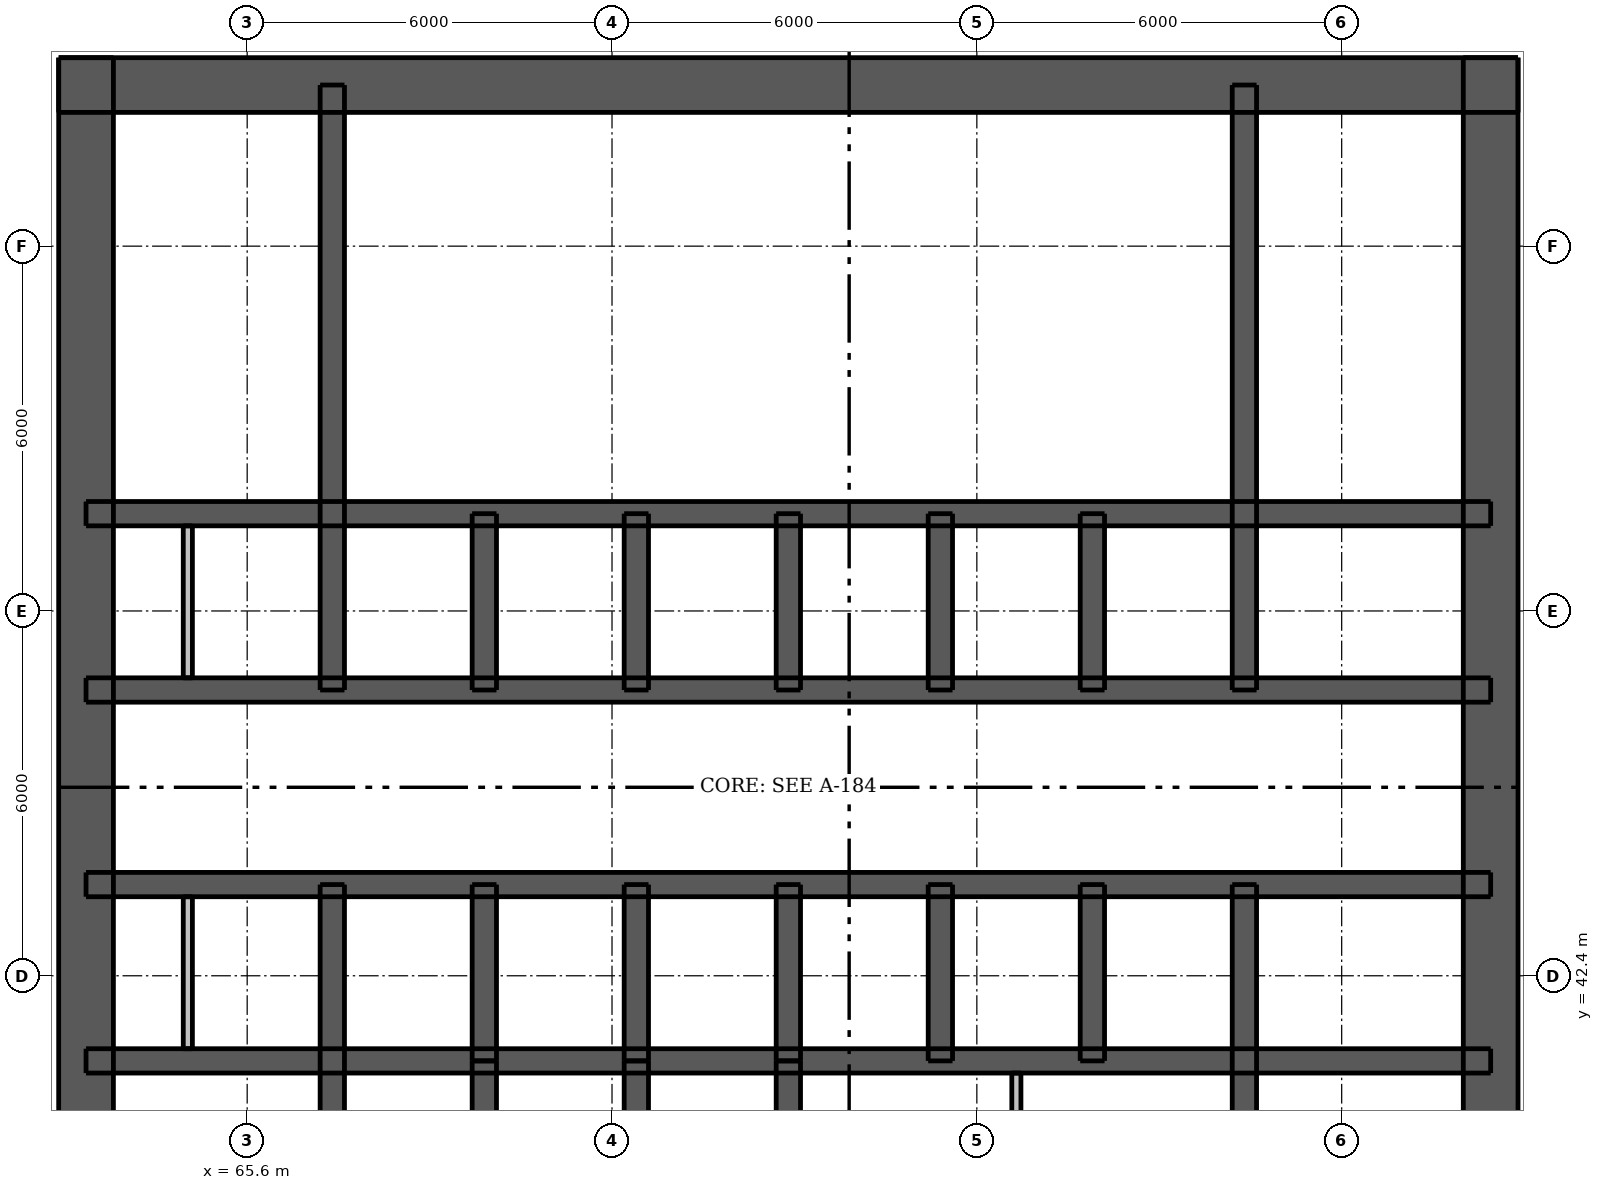
"""IFC4 building model, lengths in metres.
Left out: names, types, materials, properties, quantities, classifications, styles, units other than length and angle.
Written with IfcOpenShell. Run it as: python <this file> out.ifc"""

import sys

from ifc_helpers import new_model, si_unit, direction, frame, frame_2d, origin, place, context, subcontext, project, spatial, rectangle, extrude, element, fill, save


model = new_model("IFC4")
c1 = context("Model", 3, precision=1e-05, world=origin(), true_north=direction((0.0, 1.0)))
c2 = subcontext(c1, "Body", "Model", "MODEL_VIEW")
j1 = project(units=[si_unit("LENGTHUNIT", "METRE"), si_unit("PLANEANGLEUNIT", "RADIAN")], contexts=[c1])
p1 = place(None, origin())
s1 = spatial("IfcSite", under=j1, at=p1, CompositionType="ELEMENT")
p2 = place(p1, origin())
s2 = spatial("IfcBuilding", under=s1, at=p2, CompositionType="ELEMENT")
p3 = place(p2, frame((0.0, 0.0, 19.0)))
s3 = spatial("IfcBuildingStorey", under=s2, at=p3, CompositionType="ELEMENT", Elevation=19.0)
p4 = place(p3, frame((62.5, 57.05, 0.0), z_axis=(0.0, 0.0, 1.0), x_axis=(1.0, 0.0, 0.0)))
e1 = element("IfcWall", 1, at=p4, inside=s3, PredefinedType="SHEAR", context=c2, shape_type="SweptSolid", body=[
    extrude(rectangle(XDim=24.0, YDim=0.9, at=frame_2d((12.0, 0.0))), origin(), (0.0, 0.0, 1.0), 4.25),
])
p5 = place(p4, frame((20.85, 0.0, 0.0)))
e2 = element("IfcOpeningElement", 2, at=p5, cuts=e1, PredefinedType="OPENING", context=c2, shape_type="SweptSolid", body=[
    extrude(rectangle(XDim=1.1, YDim=2.1, at=frame_2d((0.55, 1.05))), frame((0.0, 0.46, 0.0), z_axis=(0.0, -1.0, 0.0), x_axis=(1.0, 0.0, 0.0)), (0.0, 0.0, 1.0), 0.92),
])
p6 = place(p4, frame((2.05, 0.0, 0.0)))
e3 = element("IfcOpeningElement", 3, at=p6, cuts=e1, PredefinedType="OPENING", context=c2, shape_type="SweptSolid", body=[
    extrude(rectangle(XDim=1.1, YDim=2.1, at=frame_2d((0.55, 1.05))), frame((0.0, 0.46, 0.0), z_axis=(0.0, -1.0, 0.0), x_axis=(1.0, 0.0, 0.0)), (0.0, 0.0, 1.0), 0.92),
])
p7 = place(p4, frame((11.55, 0.0, 0.0)))
e4 = element("IfcOpeningElement", 4, at=p7, cuts=e1, PredefinedType="OPENING", context=c2, shape_type="SweptSolid", body=[
    extrude(rectangle(XDim=0.9, YDim=2.1, at=frame_2d((0.45, 1.05))), frame((0.0, 0.46, 0.0), z_axis=(0.0, -1.0, 0.0), x_axis=(1.0, 0.0, 0.0)), (0.0, 0.0, 1.0), 0.92),
])
p8 = place(p3, frame((62.95, 33.5, 0.0), z_axis=(0.0, 0.0, 1.0), x_axis=(0.0, 1.0, 0.0)))
e5 = element("IfcWall", 5, at=p8, inside=s3, PredefinedType="SHEAR", context=c2, shape_type="SweptSolid", body=[
    extrude(rectangle(XDim=24.0, YDim=0.9, at=frame_2d((12.0, 0.0))), origin(), (0.0, 0.0, 1.0), 4.25),
])
p9 = place(p8, frame((11.2, 0.0, 0.0)))
e6 = element("IfcOpeningElement", 6, at=p9, cuts=e5, PredefinedType="OPENING", context=c2, shape_type="SweptSolid", body=[
    extrude(rectangle(XDim=1.6, YDim=2.1, at=frame_2d((0.8, 1.05))), frame((0.0, 0.46, 0.0), z_axis=(0.0, -1.0, 0.0), x_axis=(1.0, 0.0, 0.0)), (0.0, 0.0, 1.0), 0.92),
])
p10 = place(p3, frame((86.05, 33.5, 0.0), z_axis=(0.0, 0.0, 1.0), x_axis=(0.0, 1.0, 0.0)))
e7 = element("IfcWall", 7, at=p10, inside=s3, PredefinedType="SHEAR", context=c2, shape_type="SweptSolid", body=[
    extrude(rectangle(XDim=24.0, YDim=0.9, at=frame_2d((12.0, 0.0))), origin(), (0.0, 0.0, 1.0), 4.25),
])
p11 = place(p10, frame((11.2, 0.0, 0.0)))
e8 = element("IfcOpeningElement", 8, at=p11, cuts=e7, PredefinedType="OPENING", context=c2, shape_type="SweptSolid", body=[
    extrude(rectangle(XDim=1.6, YDim=2.1, at=frame_2d((0.8, 1.05))), frame((0.0, 0.46, 0.0), z_axis=(0.0, -1.0, 0.0), x_axis=(1.0, 0.0, 0.0)), (0.0, 0.0, 1.0), 0.92),
])
p12 = place(p3, frame((62.95, 41.0, 0.0), z_axis=(0.0, 0.0, 1.0), x_axis=(1.0, 0.0, 0.0)))
e9 = element("IfcWall", 9, at=p12, inside=s3, PredefinedType="SHEAR", context=c2, shape_type="SweptSolid", body=[
    extrude(rectangle(XDim=23.1, YDim=0.4, at=frame_2d((11.55, 0.0))), origin(), (0.0, 0.0, 1.0), 4.25),
])
p13 = place(p3, frame((62.95, 43.9, 0.0), z_axis=(0.0, 0.0, 1.0), x_axis=(1.0, 0.0, 0.0)))
e10 = element("IfcWall", 10, at=p13, inside=s3, PredefinedType="SHEAR", context=c2, shape_type="SweptSolid", body=[
    extrude(rectangle(XDim=23.1, YDim=0.4, at=frame_2d((11.55, 0.0))), origin(), (0.0, 0.0, 1.0), 4.25),
])
p14 = place(p13, frame((0.662, 0.0, 0.0)))
e11 = element("IfcOpeningElement", 11, at=p14, cuts=e10, PredefinedType="OPENING", context=c2, shape_type="SweptSolid", body=[
    extrude(rectangle(XDim=0.8, YDim=2.1, at=frame_2d((0.4, 1.05))), frame((0.0, 0.21, 0.0), z_axis=(0.0, -1.0, 0.0), x_axis=(1.0, 0.0, 0.0)), (0.0, 0.0, 1.0), 0.42),
])
p15 = place(p13, frame((2.312, 0.0, 0.0)))
e12 = element("IfcOpeningElement", 12, at=p15, cuts=e10, PredefinedType="OPENING", context=c2, shape_type="SweptSolid", body=[
    extrude(rectangle(XDim=0.9, YDim=2.1, at=frame_2d((0.45, 1.05))), frame((0.0, 0.21, 0.0), z_axis=(0.0, -1.0, 0.0), x_axis=(1.0, 0.0, 0.0)), (0.0, 0.0, 1.0), 0.42),
])
p16 = place(p13, frame((20.5, 0.0, 0.0)))
e13 = element("IfcOpeningElement", 13, at=p16, cuts=e10, PredefinedType="OPENING", context=c2, shape_type="SweptSolid", body=[
    extrude(rectangle(XDim=0.9, YDim=2.1, at=frame_2d((0.45, 1.05))), frame((0.0, 0.21, 0.0), z_axis=(0.0, -1.0, 0.0), x_axis=(1.0, 0.0, 0.0)), (0.0, 0.0, 1.0), 0.42),
])
p17 = place(p13, frame((4.75, 0.0, 0.0)))
e14 = element("IfcOpeningElement", 14, at=p17, cuts=e10, PredefinedType="OPENING", context=c2, shape_type="SweptSolid", body=[
    extrude(rectangle(XDim=1.1, YDim=2.1, at=frame_2d((0.55, 1.05))), frame((0.0, 0.21, 0.0), z_axis=(0.0, -1.0, 0.0), x_axis=(1.0, 0.0, 0.0)), (0.0, 0.0, 1.0), 0.42),
])
p18 = place(p13, frame((7.25, 0.0, 0.0)))
e15 = element("IfcOpeningElement", 15, at=p18, cuts=e10, PredefinedType="OPENING", context=c2, shape_type="SweptSolid", body=[
    extrude(rectangle(XDim=1.1, YDim=2.1, at=frame_2d((0.55, 1.05))), frame((0.0, 0.21, 0.0), z_axis=(0.0, -1.0, 0.0), x_axis=(1.0, 0.0, 0.0)), (0.0, 0.0, 1.0), 0.42),
])
p19 = place(p13, frame((9.75, 0.0, 0.0)))
e16 = element("IfcOpeningElement", 16, at=p19, cuts=e10, PredefinedType="OPENING", context=c2, shape_type="SweptSolid", body=[
    extrude(rectangle(XDim=1.1, YDim=2.1, at=frame_2d((0.55, 1.05))), frame((0.0, 0.21, 0.0), z_axis=(0.0, -1.0, 0.0), x_axis=(1.0, 0.0, 0.0)), (0.0, 0.0, 1.0), 0.42),
])
p20 = place(p13, frame((12.25, 0.0, 0.0)))
e17 = element("IfcOpeningElement", 17, at=p20, cuts=e10, PredefinedType="OPENING", context=c2, shape_type="SweptSolid", body=[
    extrude(rectangle(XDim=1.1, YDim=2.1, at=frame_2d((0.55, 1.05))), frame((0.0, 0.21, 0.0), z_axis=(0.0, -1.0, 0.0), x_axis=(1.0, 0.0, 0.0)), (0.0, 0.0, 1.0), 0.42),
])
p21 = place(p13, frame((14.75, 0.0, 0.0)))
e18 = element("IfcOpeningElement", 18, at=p21, cuts=e10, PredefinedType="OPENING", context=c2, shape_type="SweptSolid", body=[
    extrude(rectangle(XDim=1.1, YDim=2.1, at=frame_2d((0.55, 1.05))), frame((0.0, 0.21, 0.0), z_axis=(0.0, -1.0, 0.0), x_axis=(1.0, 0.0, 0.0)), (0.0, 0.0, 1.0), 0.42),
])
p22 = place(p13, frame((17.25, 0.0, 0.0)))
e19 = element("IfcOpeningElement", 19, at=p22, cuts=e10, PredefinedType="OPENING", context=c2, shape_type="SweptSolid", body=[
    extrude(rectangle(XDim=1.1, YDim=2.1, at=frame_2d((0.55, 1.05))), frame((0.0, 0.21, 0.0), z_axis=(0.0, -1.0, 0.0), x_axis=(1.0, 0.0, 0.0)), (0.0, 0.0, 1.0), 0.42),
])
p23 = place(p3, frame((62.95, 47.1, 0.0), z_axis=(0.0, 0.0, 1.0), x_axis=(1.0, 0.0, 0.0)))
e20 = element("IfcWall", 20, at=p23, inside=s3, PredefinedType="SHEAR", context=c2, shape_type="SweptSolid", body=[
    extrude(rectangle(XDim=23.1, YDim=0.4, at=frame_2d((11.55, 0.0))), origin(), (0.0, 0.0, 1.0), 4.25),
])
p24 = place(p23, frame((0.662, 0.0, 0.0)))
e21 = element("IfcOpeningElement", 21, at=p24, cuts=e20, PredefinedType="OPENING", context=c2, shape_type="SweptSolid", body=[
    extrude(rectangle(XDim=0.8, YDim=2.1, at=frame_2d((0.4, 1.05))), frame((0.0, 0.21, 0.0), z_axis=(0.0, -1.0, 0.0), x_axis=(1.0, 0.0, 0.0)), (0.0, 0.0, 1.0), 0.42),
])
p25 = place(p23, frame((2.312, 0.0, 0.0)))
e22 = element("IfcOpeningElement", 22, at=p25, cuts=e20, PredefinedType="OPENING", context=c2, shape_type="SweptSolid", body=[
    extrude(rectangle(XDim=0.9, YDim=2.1, at=frame_2d((0.45, 1.05))), frame((0.0, 0.21, 0.0), z_axis=(0.0, -1.0, 0.0), x_axis=(1.0, 0.0, 0.0)), (0.0, 0.0, 1.0), 0.42),
])
p26 = place(p23, frame((20.5, 0.0, 0.0)))
e23 = element("IfcOpeningElement", 23, at=p26, cuts=e20, PredefinedType="OPENING", context=c2, shape_type="SweptSolid", body=[
    extrude(rectangle(XDim=0.9, YDim=2.1, at=frame_2d((0.45, 1.05))), frame((0.0, 0.21, 0.0), z_axis=(0.0, -1.0, 0.0), x_axis=(1.0, 0.0, 0.0)), (0.0, 0.0, 1.0), 0.42),
])
p27 = place(p3, frame((62.95, 50.0, 0.0), z_axis=(0.0, 0.0, 1.0), x_axis=(1.0, 0.0, 0.0)))
e24 = element("IfcWall", 24, at=p27, inside=s3, PredefinedType="SHEAR", context=c2, shape_type="SweptSolid", body=[
    extrude(rectangle(XDim=23.1, YDim=0.4, at=frame_2d((11.55, 0.0))), origin(), (0.0, 0.0, 1.0), 4.25),
])
p28 = place(p3, frame((67.0, 33.95, 0.0), z_axis=(0.0, 0.0, 1.0), x_axis=(0.0, 1.0, 0.0)))
e25 = element("IfcWall", 25, at=p28, inside=s3, PredefinedType="SHEAR", context=c2, shape_type="SweptSolid", body=[
    extrude(rectangle(XDim=9.95, YDim=0.4, at=frame_2d((4.975, 0.0))), origin(), (0.0, 0.0, 1.0), 4.25),
])
p29 = place(p28, frame((0.65, 0.0, 0.0)))
e26 = element("IfcOpeningElement", 26, at=p29, cuts=e25, PredefinedType="OPENING", context=c2, shape_type="SweptSolid", body=[
    extrude(rectangle(XDim=1.1, YDim=2.1, at=frame_2d((0.55, 1.05))), frame((0.0, 0.21, 0.0), z_axis=(0.0, -1.0, 0.0), x_axis=(1.0, 0.0, 0.0)), (0.0, 0.0, 1.0), 0.42),
])
for number, where, z_axis, x_axis in (
    (27, (67.0, 47.1, 0.0), (0.0, 0.0, 1.0), (0.0, 1.0, 0.0)),
    (28, (82.0, 33.95, 0.0), (0.0, 0.0, 1.0), (0.0, 1.0, 0.0)),
    (29, (82.0, 47.1, 0.0), (0.0, 0.0, 1.0), (0.0, 1.0, 0.0)),
):
    element("IfcWall", number, at=place(p3, frame(where, z_axis=z_axis, x_axis=x_axis)), inside=s3, PredefinedType="SHEAR", context=c2, shape_type="SweptSolid", body=[
        extrude(rectangle(XDim=9.95, YDim=0.4, at=frame_2d((4.975, 0.0))), origin(), (0.0, 0.0, 1.0), 4.25),
    ])
for number, where, z_axis, x_axis in (
    (30, (69.5, 41.0, 0.0), (0.0, 0.0, 1.0), (0.0, 1.0, 0.0)),
    (31, (69.5, 47.1, 0.0), (0.0, 0.0, 1.0), (0.0, 1.0, 0.0)),
    (32, (72.0, 41.0, 0.0), (0.0, 0.0, 1.0), (0.0, 1.0, 0.0)),
    (33, (72.0, 47.1, 0.0), (0.0, 0.0, 1.0), (0.0, 1.0, 0.0)),
    (34, (74.5, 41.0, 0.0), (0.0, 0.0, 1.0), (0.0, 1.0, 0.0)),
    (35, (74.5, 47.1, 0.0), (0.0, 0.0, 1.0), (0.0, 1.0, 0.0)),
    (36, (77.0, 41.0, 0.0), (0.0, 0.0, 1.0), (0.0, 1.0, 0.0)),
    (37, (77.0, 47.1, 0.0), (0.0, 0.0, 1.0), (0.0, 1.0, 0.0)),
    (38, (79.5, 41.0, 0.0), (0.0, 0.0, 1.0), (0.0, 1.0, 0.0)),
    (39, (79.5, 47.1, 0.0), (0.0, 0.0, 1.0), (0.0, 1.0, 0.0)),
    (40, (69.5, 38.1, 0.0), (0.0, 0.0, 1.0), (0.0, 1.0, 0.0)),
    (41, (72.0, 38.1, 0.0), (0.0, 0.0, 1.0), (0.0, 1.0, 0.0)),
    (42, (74.5, 38.1, 0.0), (0.0, 0.0, 1.0), (0.0, 1.0, 0.0)),
):
    element("IfcWall", number, at=place(p3, frame(where, z_axis=z_axis, x_axis=x_axis)), inside=s3, PredefinedType="SHEAR", context=c2, shape_type="SweptSolid", body=[
        extrude(rectangle(XDim=2.9, YDim=0.4, at=frame_2d((1.45, 0.0))), origin(), (0.0, 0.0, 1.0), 4.25),
    ])
p30 = place(p3, frame((78.25, 34.4, 0.0), z_axis=(0.0, 0.0, 1.0), x_axis=(0.0, 1.0, 0.0)))
e43 = element("IfcWall", 43, at=p30, inside=s3, PredefinedType="PLUMBINGWALL", context=c2, shape_type="SweptSolid", body=[
    extrude(rectangle(XDim=6.4, YDim=0.15, at=frame_2d((3.2, 0.0))), origin(), (0.0, 0.0, 1.0), 4.25),
])
for number, where, z_axis, x_axis in (
    (44, (64.624, 41.2, 0.0), (0.0, 0.0, 1.0), (0.0, 1.0, 0.0)),
    (45, (64.624, 47.3, 0.0), (0.0, 0.0, 1.0), (0.0, 1.0, 0.0)),
):
    element("IfcWall", number, at=place(p3, frame(where, z_axis=z_axis, x_axis=x_axis)), inside=s3, PredefinedType="PLUMBINGWALL", context=c2, shape_type="SweptSolid", body=[
        extrude(rectangle(XDim=2.5, YDim=0.15, at=frame_2d((1.25, 0.0))), origin(), (0.0, 0.0, 1.0), 4.25),
    ])
p31 = place(p5, origin())
e46 = element("IfcDoor", 46, at=p31, inside=s3, OperationType="SINGLE_SWING_RIGHT", PredefinedType="DOOR", context=c2, shape_type="SweptSolid", body=[
    extrude(rectangle(XDim=1.1, YDim=2.1, at=frame_2d((0.55, 1.05))), frame((0.0, -0.388, 0.0), z_axis=(0.0, -1.0, 0.0), x_axis=(1.0, 0.0, 0.0)), (0.0, 0.0, 1.0), 0.05),
])
fill(e2, e46)
p32 = place(p6, origin())
e47 = element("IfcDoor", 47, at=p32, inside=s3, OperationType="SINGLE_SWING_LEFT", PredefinedType="DOOR", context=c2, shape_type="SweptSolid", body=[
    extrude(rectangle(XDim=1.1, YDim=2.1, at=frame_2d((0.55, 1.05))), frame((0.0, -0.388, 0.0), z_axis=(0.0, -1.0, 0.0), x_axis=(1.0, 0.0, 0.0)), (0.0, 0.0, 1.0), 0.05),
])
fill(e3, e47)
p33 = place(p9, origin())
e48 = element("IfcDoor", 48, at=p33, inside=s3, OperationType="DOUBLE_DOOR_SINGLE_SWING", PredefinedType="DOOR", context=c2, shape_type="SweptSolid", body=[
    extrude(rectangle(XDim=1.6, YDim=2.1, at=frame_2d((0.8, 1.05))), frame((0.0, -0.388, 0.0), z_axis=(0.0, -1.0, 0.0), x_axis=(1.0, 0.0, 0.0)), (0.0, 0.0, 1.0), 0.05),
])
fill(e6, e48)
p34 = place(p11, origin())
e49 = element("IfcDoor", 49, at=p34, inside=s3, OperationType="DOUBLE_DOOR_SINGLE_SWING", PredefinedType="DOOR", context=c2, shape_type="SweptSolid", body=[
    extrude(rectangle(XDim=1.6, YDim=2.1, at=frame_2d((0.8, 1.05))), frame((0.0, 0.438, 0.0), z_axis=(0.0, -1.0, 0.0), x_axis=(1.0, 0.0, 0.0)), (0.0, 0.0, 1.0), 0.05),
])
fill(e8, e49)
p35 = place(p14, origin())
e50 = element("IfcDoor", 50, at=p35, inside=s3, OperationType="SINGLE_SWING_LEFT", PredefinedType="DOOR", context=c2, shape_type="SweptSolid", body=[
    extrude(rectangle(XDim=0.8, YDim=2.1, at=frame_2d((0.4, 1.05))), frame((0.0, -0.138, 0.0), z_axis=(0.0, -1.0, 0.0), x_axis=(1.0, 0.0, 0.0)), (0.0, 0.0, 1.0), 0.05),
])
fill(e11, e50)
p36 = place(p15, origin())
e51 = element("IfcDoor", 51, at=p36, inside=s3, OperationType="SINGLE_SWING_RIGHT", PredefinedType="DOOR", context=c2, shape_type="SweptSolid", body=[
    extrude(rectangle(XDim=0.9, YDim=2.1, at=frame_2d((0.45, 1.05))), frame((0.0, -0.138, 0.0), z_axis=(0.0, -1.0, 0.0), x_axis=(1.0, 0.0, 0.0)), (0.0, 0.0, 1.0), 0.05),
])
fill(e12, e51)
p37 = place(p16, origin())
e52 = element("IfcDoor", 52, at=p37, inside=s3, OperationType="SINGLE_SWING_LEFT", PredefinedType="DOOR", context=c2, shape_type="SweptSolid", body=[
    extrude(rectangle(XDim=0.9, YDim=2.1, at=frame_2d((0.45, 1.05))), frame((0.0, -0.138, 0.0), z_axis=(0.0, -1.0, 0.0), x_axis=(1.0, 0.0, 0.0)), (0.0, 0.0, 1.0), 0.05),
])
fill(e13, e52)
p38 = place(p24, origin())
e53 = element("IfcDoor", 53, at=p38, inside=s3, OperationType="SINGLE_SWING_LEFT", PredefinedType="DOOR", context=c2, shape_type="SweptSolid", body=[
    extrude(rectangle(XDim=0.8, YDim=2.1, at=frame_2d((0.4, 1.05))), frame((0.0, 0.188, 0.0), z_axis=(0.0, -1.0, 0.0), x_axis=(1.0, 0.0, 0.0)), (0.0, 0.0, 1.0), 0.05),
])
fill(e21, e53)
p39 = place(p25, origin())
e54 = element("IfcDoor", 54, at=p39, inside=s3, OperationType="SINGLE_SWING_RIGHT", PredefinedType="DOOR", context=c2, shape_type="SweptSolid", body=[
    extrude(rectangle(XDim=0.9, YDim=2.1, at=frame_2d((0.45, 1.05))), frame((0.0, 0.188, 0.0), z_axis=(0.0, -1.0, 0.0), x_axis=(1.0, 0.0, 0.0)), (0.0, 0.0, 1.0), 0.05),
])
fill(e22, e54)
p40 = place(p26, origin())
e55 = element("IfcDoor", 55, at=p40, inside=s3, OperationType="SINGLE_SWING_LEFT", PredefinedType="DOOR", context=c2, shape_type="SweptSolid", body=[
    extrude(rectangle(XDim=0.9, YDim=2.1, at=frame_2d((0.45, 1.05))), frame((0.0, 0.188, 0.0), z_axis=(0.0, -1.0, 0.0), x_axis=(1.0, 0.0, 0.0)), (0.0, 0.0, 1.0), 0.05),
])
fill(e23, e55)
p41 = place(p7, origin())
e56 = element("IfcDoor", 56, at=p41, inside=s3, OperationType="SINGLE_SWING_RIGHT", PredefinedType="DOOR", context=c2, shape_type="SweptSolid", body=[
    extrude(rectangle(XDim=0.9, YDim=2.1, at=frame_2d((0.45, 1.05))), frame((0.0, -0.388, 0.0), z_axis=(0.0, -1.0, 0.0), x_axis=(1.0, 0.0, 0.0)), (0.0, 0.0, 1.0), 0.05),
])
fill(e4, e56)
p42 = place(p17, origin())
e57 = element("IfcDoor", 57, at=p42, inside=s3, OperationType="DOUBLE_DOOR_SLIDING", PredefinedType="DOOR", context=c2, shape_type="SweptSolid", body=[
    extrude(rectangle(XDim=1.1, YDim=2.1, at=frame_2d((0.55, 1.05))), frame((0.0, 0.025, 0.0), z_axis=(0.0, -1.0, 0.0), x_axis=(1.0, 0.0, 0.0)), (0.0, 0.0, 1.0), 0.05),
])
fill(e14, e57)
p43 = place(p18, origin())
e58 = element("IfcDoor", 58, at=p43, inside=s3, OperationType="DOUBLE_DOOR_SLIDING", PredefinedType="DOOR", context=c2, shape_type="SweptSolid", body=[
    extrude(rectangle(XDim=1.1, YDim=2.1, at=frame_2d((0.55, 1.05))), frame((0.0, 0.025, 0.0), z_axis=(0.0, -1.0, 0.0), x_axis=(1.0, 0.0, 0.0)), (0.0, 0.0, 1.0), 0.05),
])
fill(e15, e58)
p44 = place(p19, origin())
e59 = element("IfcDoor", 59, at=p44, inside=s3, OperationType="DOUBLE_DOOR_SLIDING", PredefinedType="DOOR", context=c2, shape_type="SweptSolid", body=[
    extrude(rectangle(XDim=1.1, YDim=2.1, at=frame_2d((0.55, 1.05))), frame((0.0, 0.025, 0.0), z_axis=(0.0, -1.0, 0.0), x_axis=(1.0, 0.0, 0.0)), (0.0, 0.0, 1.0), 0.05),
])
fill(e16, e59)
p45 = place(p20, origin())
e60 = element("IfcDoor", 60, at=p45, inside=s3, OperationType="DOUBLE_DOOR_SLIDING", PredefinedType="DOOR", context=c2, shape_type="SweptSolid", body=[
    extrude(rectangle(XDim=1.1, YDim=2.1, at=frame_2d((0.55, 1.05))), frame((0.0, 0.025, 0.0), z_axis=(0.0, -1.0, 0.0), x_axis=(1.0, 0.0, 0.0)), (0.0, 0.0, 1.0), 0.05),
])
fill(e17, e60)
p46 = place(p21, origin())
e61 = element("IfcDoor", 61, at=p46, inside=s3, OperationType="DOUBLE_DOOR_SLIDING", PredefinedType="DOOR", context=c2, shape_type="SweptSolid", body=[
    extrude(rectangle(XDim=1.1, YDim=2.1, at=frame_2d((0.55, 1.05))), frame((0.0, 0.025, 0.0), z_axis=(0.0, -1.0, 0.0), x_axis=(1.0, 0.0, 0.0)), (0.0, 0.0, 1.0), 0.05),
])
fill(e18, e61)
p47 = place(p22, origin())
e62 = element("IfcDoor", 62, at=p47, inside=s3, OperationType="DOUBLE_DOOR_SLIDING", PredefinedType="DOOR", context=c2, shape_type="SweptSolid", body=[
    extrude(rectangle(XDim=1.1, YDim=2.1, at=frame_2d((0.55, 1.05))), frame((0.0, 0.025, 0.0), z_axis=(0.0, -1.0, 0.0), x_axis=(1.0, 0.0, 0.0)), (0.0, 0.0, 1.0), 0.05),
])
fill(e19, e62)
save(model, sys.argv[1])
